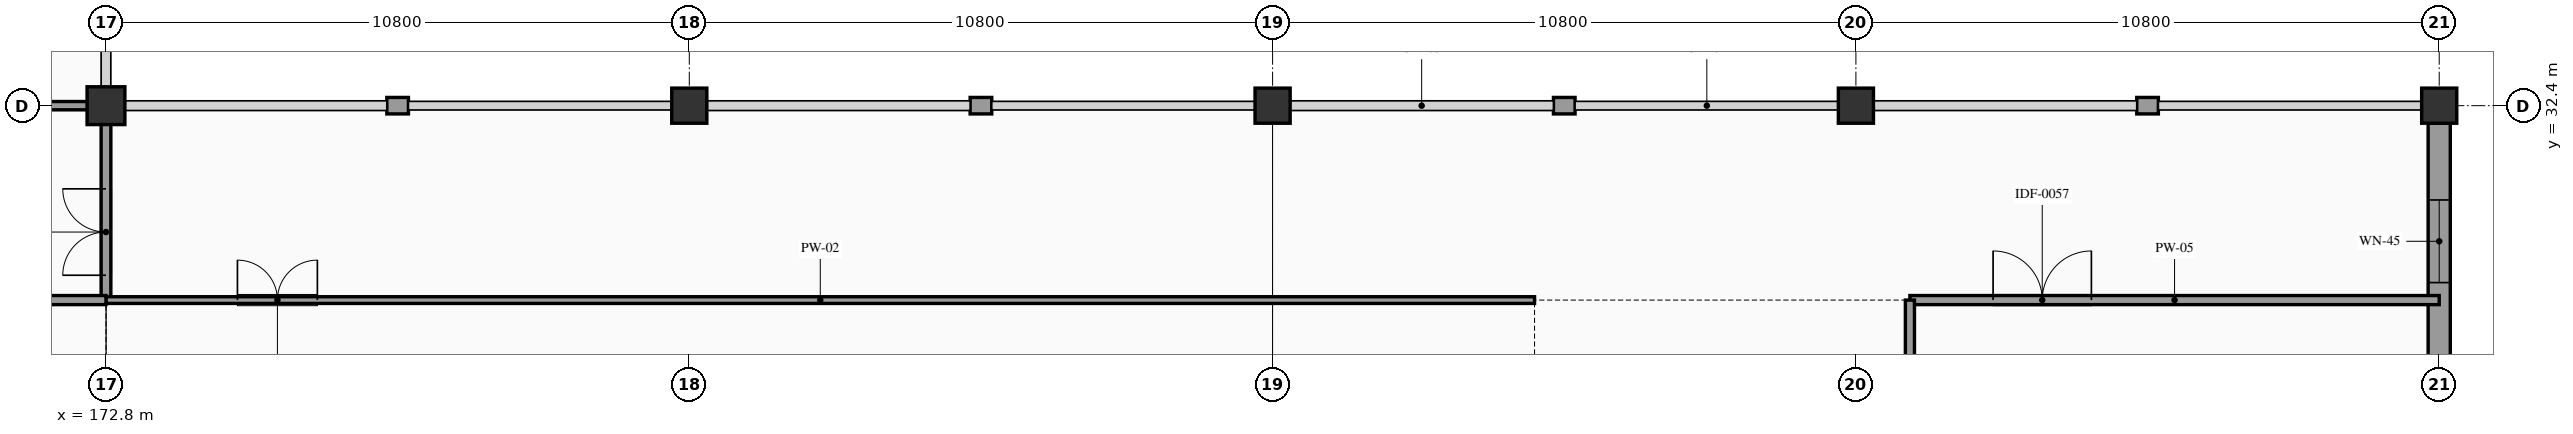
"""IFC4 building model, lengths in metres.
Left out: names, types, materials, properties, quantities, classifications, styles, units other than length and angle.
Written with IfcOpenShell. Run it as: python <this file> out.ifc"""

import sys

from ifc_helpers import new_model, si_unit, direction, frame, frame_2d, origin, origin_2d, place, context, subcontext, project, spatial, rectangle, extrude, element, fill, save


model = new_model("IFC4")
c1 = context("Model", 3, precision=1e-05, world=origin(), true_north=direction((0.0, 1.0)))
c2 = subcontext(c1, "Body", "Model", "MODEL_VIEW")
j1 = project(units=[si_unit("LENGTHUNIT", "METRE"), si_unit("PLANEANGLEUNIT", "RADIAN")], contexts=[c1])
p1 = place(None, origin())
s1 = spatial("IfcSite", under=j1, at=p1, CompositionType="ELEMENT")
p2 = place(p1, origin())
s2 = spatial("IfcBuilding", under=s1, at=p2, CompositionType="ELEMENT")
p3 = place(p2, frame((0.0, 0.0, 5.4)))
s3 = spatial("IfcBuildingStorey", under=s2, at=p3, CompositionType="ELEMENT", Elevation=5.4)
p4 = place(p3, frame((172.8, 32.4, 0.0), z_axis=(0.0, 0.0, 1.0), x_axis=(1.0, 0.0, 0.0)))
e1 = element("IfcColumn", 1, at=p4, inside=s3, PredefinedType="COLUMN", context=c2, shape_type="SweptSolid", body=[
    extrude(rectangle(XDim=0.7, YDim=0.7, at=origin_2d()), origin(), (0.0, 0.0, 1.0), 4.68),
])
for number, where, z_axis, x_axis in (
    (2, (183.6, 32.4, 0.0), (0.0, 0.0, 1.0), (1.0, 0.0, 0.0)),
    (3, (194.4, 32.4, 0.0), (0.0, 0.0, 1.0), (1.0, 0.0, 0.0)),
    (4, (205.2, 32.4, 0.0), (0.0, 0.0, 1.0), (1.0, 0.0, 0.0)),
    (5, (216.0, 32.4, 0.0), (0.0, 0.0, 1.0), (1.0, 0.0, 0.0)),
):
    element("IfcColumn", number, at=place(p3, frame(where, z_axis=z_axis, x_axis=x_axis)), inside=s3, PredefinedType="COLUMN", context=c2, shape_type="SweptSolid", body=[
        extrude(rectangle(XDim=0.65, YDim=0.65, at=origin_2d()), origin(), (0.0, 0.0, 1.0), 4.68),
    ])
for number, where, z_axis, x_axis in (
    (6, (178.0, 32.4, 0.0), (0.0, 0.0, 1.0), (1.0, 0.0, 0.0)),
    (7, (188.8, 32.4, 0.0), (0.0, 0.0, 1.0), (1.0, 0.0, 0.0)),
    (8, (199.6, 32.4, 0.0), (0.0, 0.0, 1.0), (1.0, 0.0, 0.0)),
):
    element("IfcWall", number, at=place(p3, frame(where, z_axis=z_axis, x_axis=x_axis)), inside=s3, PredefinedType="STANDARD", context=c2, shape_type="SweptSolid", body=[
        extrude(rectangle(XDim=0.4, YDim=0.305, at=frame_2d((0.2, 0.0))), origin(), (0.0, 0.0, 1.0), 3.53),
    ])
p5 = place(p3, frame((210.4, 32.4, 0.0), z_axis=(0.0, 0.0, 1.0), x_axis=(1.0, 0.0, 0.0)))
e9 = element("IfcWall", 9, at=p5, inside=s3, PredefinedType="STANDARD", context=c2, shape_type="SweptSolid", body=[
    extrude(rectangle(XDim=0.4, YDim=0.305, at=frame_2d((0.2, 0.0))), origin(), (0.0, 0.0, 1.0), 3.53),
])
p6 = place(p3, frame((216.0, 21.92, 0.0), z_axis=(0.0, 0.0, 1.0), x_axis=(0.0, 1.0, 0.0)))
e10 = element("IfcWall", 10, at=p6, inside=s3, PredefinedType="STANDARD", context=c2, shape_type="SweptSolid", body=[
    extrude(rectangle(XDim=10.16, YDim=0.41, at=frame_2d((5.08, 0.0))), origin(), (0.0, 0.0, 1.0), 3.53),
])
p7 = place(p6, frame((1.405, 0.0, 0.95)))
e11 = element("IfcOpeningElement", 11, at=p7, cuts=e10, PredefinedType="OPENING", context=c2, shape_type="SweptSolid", body=[
    extrude(rectangle(XDim=1.29, YDim=1.65, at=frame_2d((0.645, 0.825))), frame((0.0, 0.215, 0.0), z_axis=(0.0, -1.0, 0.0), x_axis=(1.0, 0.0, 0.0)), (0.0, 0.0, 1.0), 0.43),
])
p8 = place(p6, frame((4.275, 0.0, 0.95)))
e12 = element("IfcOpeningElement", 12, at=p8, cuts=e10, PredefinedType="OPENING", context=c2, shape_type="SweptSolid", body=[
    extrude(rectangle(XDim=1.41, YDim=1.65, at=frame_2d((0.705, 0.825))), frame((0.0, 0.215, 0.0), z_axis=(0.0, -1.0, 0.0), x_axis=(1.0, 0.0, 0.0)), (0.0, 0.0, 1.0), 0.43),
])
p9 = place(p6, frame((7.204, 0.0, 0.95)))
e13 = element("IfcOpeningElement", 13, at=p9, cuts=e10, PredefinedType="OPENING", context=c2, shape_type="SweptSolid", body=[
    extrude(rectangle(XDim=1.53, YDim=1.65, at=frame_2d((0.765, 0.825))), frame((0.0, 0.215, 0.0), z_axis=(0.0, -1.0, 0.0), x_axis=(1.0, 0.0, 0.0)), (0.0, 0.0, 1.0), 0.43),
])
p10 = place(p3, frame((172.8, 28.8, 0.0), z_axis=(0.0, 0.0, 1.0), x_axis=(0.0, 1.0, 0.0)))
e14 = element("IfcWall", 14, at=p10, inside=s3, PredefinedType="PARTITIONING", context=c2, shape_type="SweptSolid", body=[
    extrude(rectangle(XDim=3.6, YDim=0.18, at=frame_2d((1.8, 0.0))), origin(), (0.0, 0.0, 1.0), 3.23),
])
p11 = place(p10, frame((0.46, 0.0, 0.0)))
e15 = element("IfcOpeningElement", 15, at=p11, cuts=e14, PredefinedType="OPENING", context=c2, shape_type="SweptSolid", body=[
    extrude(rectangle(XDim=1.6, YDim=2.2, at=frame_2d((0.8, 1.1))), frame((0.0, 0.1, 0.0), z_axis=(0.0, -1.0, 0.0), x_axis=(1.0, 0.0, 0.0)), (0.0, 0.0, 1.0), 0.2),
])
p12 = place(p3, frame((206.2, 28.8, 0.0), z_axis=(0.0, 0.0, 1.0), x_axis=(1.0, 0.0, 0.0)))
e16 = element("IfcWall", 16, at=p12, inside=s3, PredefinedType="PARTITIONING", context=c2, shape_type="SweptSolid", body=[
    extrude(rectangle(XDim=9.8, YDim=0.168, at=frame_2d((4.9, 0.0))), origin(), (0.0, 0.0, 1.0), 3.23),
])
p13 = place(p12, frame((1.54, 0.0, 0.0)))
e17 = element("IfcOpeningElement", 17, at=p13, cuts=e16, PredefinedType="OPENING", context=c2, shape_type="SweptSolid", body=[
    extrude(rectangle(XDim=1.82, YDim=2.25, at=frame_2d((0.91, 1.125))), frame((0.0, 0.094, 0.0), z_axis=(0.0, -1.0, 0.0), x_axis=(1.0, 0.0, 0.0)), (0.0, 0.0, 1.0), 0.188),
])
p14 = place(p3, frame((172.8, 28.8, 0.0), z_axis=(0.0, 0.0, 1.0), x_axis=(1.0, 0.0, 0.0)))
e18 = element("IfcWall", 18, at=p14, inside=s3, PredefinedType="PARTITIONING", context=c2, shape_type="SweptSolid", body=[
    extrude(rectangle(XDim=26.45, YDim=0.124, at=frame_2d((13.225, 0.0))), origin(), (0.0, 0.0, 1.0), 3.23),
])
p15 = place(p14, frame((2.434, 0.0, 0.0)))
e19 = element("IfcOpeningElement", 19, at=p15, cuts=e18, PredefinedType="OPENING", context=c2, shape_type="SweptSolid", body=[
    extrude(rectangle(XDim=1.48, YDim=2.2, at=frame_2d((0.74, 1.1))), frame((0.0, 0.072, 0.0), z_axis=(0.0, -1.0, 0.0), x_axis=(1.0, 0.0, 0.0)), (0.0, 0.0, 1.0), 0.144),
])
p16 = place(p3, frame((155.45, 28.8, 0.0), z_axis=(0.0, 0.0, 1.0), x_axis=(1.0, 0.0, 0.0)))
e20 = element("IfcWall", 20, at=p16, inside=s3, PredefinedType="PARTITIONING", context=c2, shape_type="SweptSolid", body=[
    extrude(rectangle(XDim=17.35, YDim=0.168, at=frame_2d((8.675, 0.0))), origin(), (0.0, 0.0, 1.0), 3.23),
])
p17 = place(p3, frame((162.0, 32.4, 0.0), z_axis=(0.0, 0.0, 1.0), x_axis=(1.0, 0.0, 0.0)))
e21 = element("IfcWall", 21, at=p17, inside=s3, PredefinedType="PARTITIONING", context=c2, shape_type="SweptSolid", body=[
    extrude(rectangle(XDim=10.8, YDim=0.154, at=frame_2d((5.4, 0.0))), origin(), (0.0, 0.0, 1.0), 3.23),
])
p18 = place(p3, frame((206.2, 5.4, 0.0), z_axis=(0.0, 0.0, 1.0), x_axis=(0.0, 1.0, 0.0)))
e22 = element("IfcWall", 22, at=p18, inside=s3, PredefinedType="PARTITIONING", context=c2, shape_type="SweptSolid", body=[
    extrude(rectangle(XDim=23.4, YDim=0.168, at=frame_2d((11.7, 0.0))), origin(), (0.0, 0.0, 1.0), 3.23),
])
p19 = place(p9, frame((1.53, 0.0, 0.0), z_axis=(0.0, 0.0, 1.0), x_axis=(-1.0, 0.0, 0.0)))
e23 = element("IfcWindow", 23, at=p19, inside=s3, PartitioningType="SINGLE_PANEL", PredefinedType="WINDOW", context=c2, shape_type="SweptSolid", body=[
    extrude(rectangle(XDim=1.53, YDim=1.65, at=frame_2d((0.765, 0.825))), frame((0.0, 0.03, 0.0), z_axis=(0.0, -1.0, 0.0), x_axis=(1.0, 0.0, 0.0)), (0.0, 0.0, 1.0), 0.06),
])
fill(e13, e23)
p20 = place(p11, origin())
e24 = element("IfcDoor", 24, at=p20, inside=s3, OperationType="DOUBLE_DOOR_SINGLE_SWING", PredefinedType="DOOR", context=c2, shape_type="SweptSolid", body=[
    extrude(rectangle(XDim=1.6, YDim=2.2, at=frame_2d((0.8, 1.1))), frame((0.0, 0.025, 0.0), z_axis=(0.0, -1.0, 0.0), x_axis=(1.0, 0.0, 0.0)), (0.0, 0.0, 1.0), 0.05),
])
fill(e15, e24)
p21 = place(p13, frame((1.82, 0.0, 0.0), z_axis=(0.0, 0.0, 1.0), x_axis=(-1.0, 0.0, 0.0)))
e25 = element("IfcDoor", 25, at=p21, inside=s3, OperationType="DOUBLE_DOOR_SINGLE_SWING", PredefinedType="DOOR", context=c2, shape_type="SweptSolid", body=[
    extrude(rectangle(XDim=1.82, YDim=2.25, at=frame_2d((0.91, 1.125))), frame((0.0, 0.025, 0.0), z_axis=(0.0, -1.0, 0.0), x_axis=(1.0, 0.0, 0.0)), (0.0, 0.0, 1.0), 0.05),
])
fill(e17, e25)
p22 = place(p15, origin())
e26 = element("IfcDoor", 26, at=p22, inside=s3, OperationType="DOUBLE_DOOR_SINGLE_SWING", PredefinedType="DOOR", context=c2, shape_type="SweptSolid", body=[
    extrude(rectangle(XDim=1.48, YDim=2.2, at=frame_2d((0.74, 1.1))), frame((0.0, 0.025, 0.0), z_axis=(0.0, -1.0, 0.0), x_axis=(1.0, 0.0, 0.0)), (0.0, 0.0, 1.0), 0.05),
])
fill(e19, e26)
save(model, sys.argv[1])
